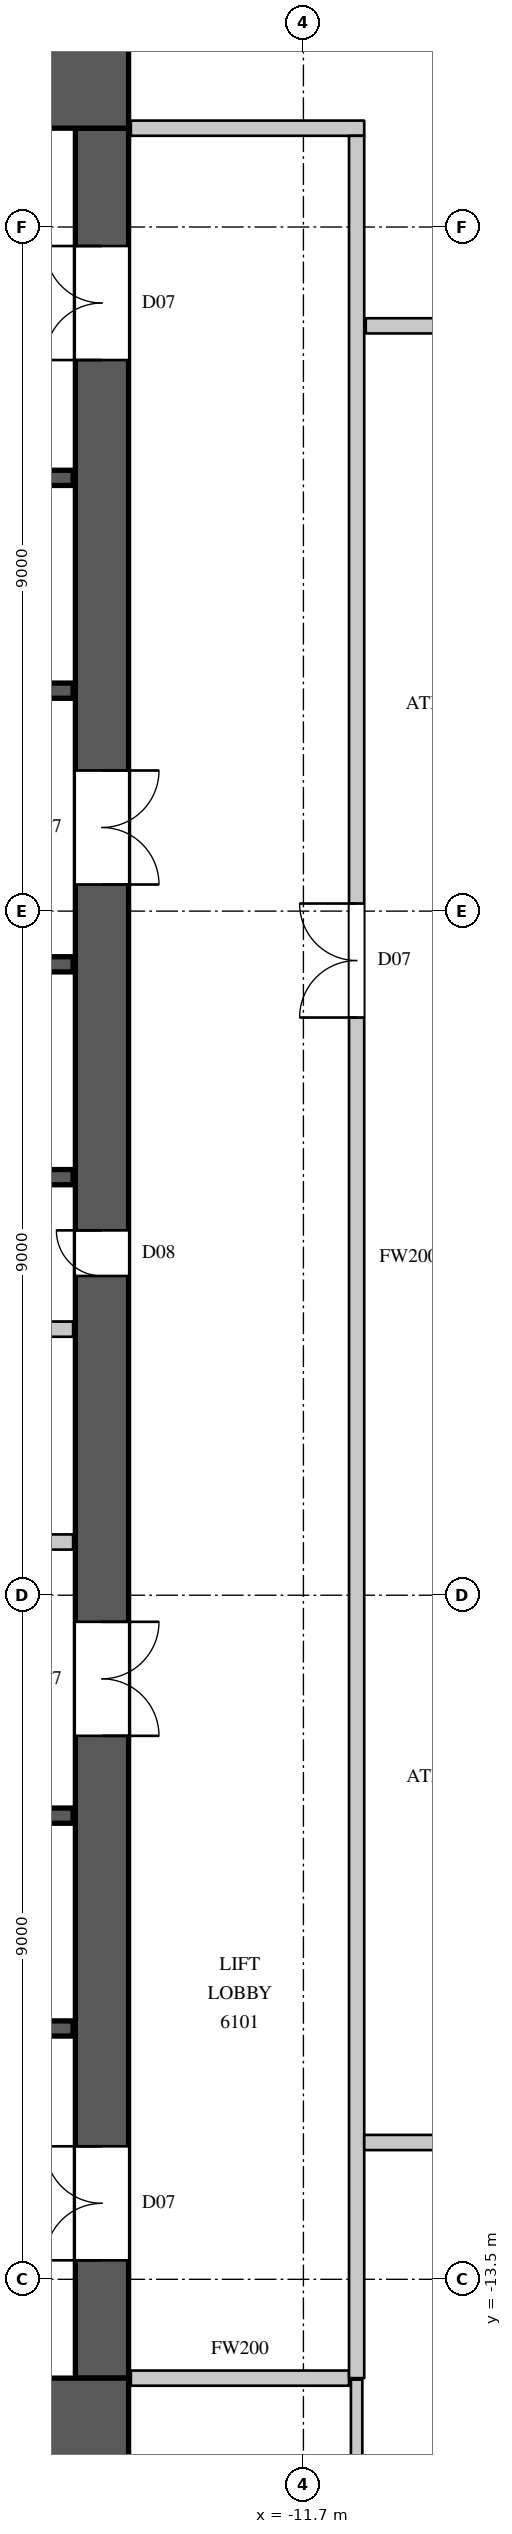
"""IFC4 building model, lengths in metres.
Left out: names, types, materials, properties, quantities, classifications, styles, units other than length and angle.
Written with IfcOpenShell. Run it as: python <this file> out.ifc"""

import sys

from ifc_helpers import new_model, si_unit, direction, frame, frame_2d, origin, place, context, subcontext, project, spatial, rectangle, extrude, element, fill, save


model = new_model("IFC4")
c1 = context("Model", 3, precision=1e-05, world=origin(), true_north=direction((0.0, 1.0)))
c2 = subcontext(c1, "Body", "Model", "MODEL_VIEW")
j1 = project(units=[si_unit("LENGTHUNIT", "METRE"), si_unit("PLANEANGLEUNIT", "RADIAN")], contexts=[c1])
p1 = place(None, origin())
s1 = spatial("IfcSite", under=j1, at=p1, CompositionType="ELEMENT")
p2 = place(p1, origin())
s2 = spatial("IfcBuilding", under=s1, at=p2, CompositionType="ELEMENT")
p3 = place(p2, frame((0.0, 0.0, 272.1)))
s3 = spatial("IfcBuildingStorey", under=s2, at=p3, CompositionType="ELEMENT", Elevation=272.1)
for number, where, z_axis, x_axis in (
    (1, (-30.0, 15.4, 0.0), (0.0, 0.0, 1.0), (1.0, 0.0, 0.0)),
    (2, (-30.0, -15.4, 0.0), (0.0, 0.0, 1.0), (1.0, 0.0, 0.0)),
):
    element("IfcWall", number, at=place(p3, frame(where, z_axis=z_axis, x_axis=x_axis)), inside=s3, PredefinedType="SHEAR", context=c2, shape_type="SweptSolid", body=[
        extrude(rectangle(XDim=16.0, YDim=1.2, at=frame_2d((8.0, 0.0))), origin(), (0.0, 0.0, 1.0), 4.1),
    ])
p4 = place(p3, frame((-14.35, -14.8, 0.0), z_axis=(0.0, 0.0, 1.0), x_axis=(0.0, 1.0, 0.0)))
e3 = element("IfcWall", 3, at=p4, inside=s3, PredefinedType="SHEAR", context=c2, shape_type="SweptSolid", body=[
    extrude(rectangle(XDim=29.6, YDim=0.7, at=frame_2d((14.8, 0.0))), origin(), (0.0, 0.0, 1.0), 4.1),
])
p5 = place(p4, frame((1.55, 0.0, 0.0)))
e4 = element("IfcOpeningElement", 4, at=p5, cuts=e3, PredefinedType="OPENING", context=c2, shape_type="SweptSolid", body=[
    extrude(rectangle(XDim=1.5, YDim=2.4, at=frame_2d((0.75, 1.2))), frame((0.0, 0.36, 0.0), z_axis=(0.0, -1.0, 0.0), x_axis=(1.0, 0.0, 0.0)), (0.0, 0.0, 1.0), 0.72),
])
p6 = place(p4, frame((26.55, 0.0, 0.0)))
e5 = element("IfcOpeningElement", 5, at=p6, cuts=e3, PredefinedType="OPENING", context=c2, shape_type="SweptSolid", body=[
    extrude(rectangle(XDim=1.5, YDim=2.4, at=frame_2d((0.75, 1.2))), frame((0.0, 0.36, 0.0), z_axis=(0.0, -1.0, 0.0), x_axis=(1.0, 0.0, 0.0)), (0.0, 0.0, 1.0), 0.72),
])
p7 = place(p4, frame((8.45, 0.0, 0.0)))
e6 = element("IfcOpeningElement", 6, at=p7, cuts=e3, PredefinedType="OPENING", context=c2, shape_type="SweptSolid", body=[
    extrude(rectangle(XDim=1.5, YDim=2.4, at=frame_2d((0.75, 1.2))), frame((0.0, 0.36, 0.0), z_axis=(0.0, -1.0, 0.0), x_axis=(1.0, 0.0, 0.0)), (0.0, 0.0, 1.0), 0.72),
])
p8 = place(p4, frame((19.65, 0.0, 0.0)))
e7 = element("IfcOpeningElement", 7, at=p8, cuts=e3, PredefinedType="OPENING", context=c2, shape_type="SweptSolid", body=[
    extrude(rectangle(XDim=1.5, YDim=2.4, at=frame_2d((0.75, 1.2))), frame((0.0, 0.36, 0.0), z_axis=(0.0, -1.0, 0.0), x_axis=(1.0, 0.0, 0.0)), (0.0, 0.0, 1.0), 0.72),
])
p9 = place(p4, frame((14.5, 0.0, 0.0)))
e8 = element("IfcOpeningElement", 8, at=p9, cuts=e3, PredefinedType="OPENING", context=c2, shape_type="SweptSolid", body=[
    extrude(rectangle(XDim=0.6, YDim=2.0, at=frame_2d((0.3, 1.0))), frame((0.0, 0.36, 0.0), z_axis=(0.0, -1.0, 0.0), x_axis=(1.0, 0.0, 0.0)), (0.0, 0.0, 1.0), 0.72),
])
p10 = place(p3, frame((-29.27, -3.8, 0.0), z_axis=(0.0, 0.0, 1.0), x_axis=(1.0, 0.0, 0.0)))
e9 = element("IfcWall", 9, at=p10, inside=s3, PredefinedType="PARTITIONING", context=c2, shape_type="SweptSolid", body=[
    extrude(rectangle(XDim=14.54, YDim=0.2, at=frame_2d((7.27, 0.0))), origin(), (0.0, 0.0, 1.0), 3.8),
])
p11 = place(p10, frame((0.8, 0.0, 0.0)))
e10 = element("IfcOpeningElement", 10, at=p11, cuts=e9, PredefinedType="OPENING", context=c2, shape_type="SweptSolid", body=[
    extrude(rectangle(XDim=0.9, YDim=2.2, at=frame_2d((0.45, 1.1))), frame((0.0, 0.11, 0.0), z_axis=(0.0, -1.0, 0.0), x_axis=(1.0, 0.0, 0.0)), (0.0, 0.0, 1.0), 0.22),
])
p12 = place(p10, frame((3.8, 0.0, 0.0)))
e11 = element("IfcOpeningElement", 11, at=p12, cuts=e9, PredefinedType="OPENING", context=c2, shape_type="SweptSolid", body=[
    extrude(rectangle(XDim=0.9, YDim=2.2, at=frame_2d((0.45, 1.1))), frame((0.0, 0.11, 0.0), z_axis=(0.0, -1.0, 0.0), x_axis=(1.0, 0.0, 0.0)), (0.0, 0.0, 1.0), 0.22),
])
p13 = place(p10, frame((8.25, 0.0, 0.0)))
e12 = element("IfcOpeningElement", 12, at=p13, cuts=e9, PredefinedType="OPENING", context=c2, shape_type="SweptSolid", body=[
    extrude(rectangle(XDim=0.9, YDim=2.2, at=frame_2d((0.45, 1.1))), frame((0.0, 0.11, 0.0), z_axis=(0.0, -1.0, 0.0), x_axis=(1.0, 0.0, 0.0)), (0.0, 0.0, 1.0), 0.22),
])
p14 = place(p10, frame((12.35, 0.0, 0.0)))
e13 = element("IfcOpeningElement", 13, at=p14, cuts=e9, PredefinedType="OPENING", context=c2, shape_type="SweptSolid", body=[
    extrude(rectangle(XDim=0.9, YDim=2.2, at=frame_2d((0.45, 1.1))), frame((0.0, 0.11, 0.0), z_axis=(0.0, -1.0, 0.0), x_axis=(1.0, 0.0, 0.0)), (0.0, 0.0, 1.0), 0.22),
])
p15 = place(p3, frame((-13.97, -14.8, 0.0), z_axis=(0.0, 0.0, 1.0), x_axis=(1.0, 0.0, 0.0)))
e14 = element("IfcWall", 14, at=p15, inside=s3, PredefinedType="PARTITIONING", context=c2, shape_type="SweptSolid", body=[
    extrude(rectangle(XDim=2.87, YDim=0.2, at=frame_2d((1.435, 0.0))), origin(), (0.0, 0.0, 1.0), 3.8),
])
p16 = place(p3, frame((-13.97, 14.8, 0.0), z_axis=(0.0, 0.0, 1.0), x_axis=(1.0, 0.0, 0.0)))
e15 = element("IfcWall", 15, at=p16, inside=s3, PredefinedType="PARTITIONING", context=c2, shape_type="SweptSolid", body=[
    extrude(rectangle(XDim=3.07, YDim=0.2, at=frame_2d((1.535, 0.0))), origin(), (0.0, 0.0, 1.0), 3.8),
])
p17 = place(p3, frame((-11.0, -14.8, 0.0), z_axis=(0.0, 0.0, 1.0), x_axis=(0.0, 1.0, 0.0)))
e16 = element("IfcWall", 16, at=p17, inside=s3, PredefinedType="PARTITIONING", context=c2, shape_type="SweptSolid", body=[
    extrude(rectangle(XDim=29.5, YDim=0.2, at=frame_2d((14.75, 0.0))), origin(), (0.0, 0.0, 1.0), 3.8),
])
p18 = place(p17, frame((17.9, 0.0, 0.0)))
e17 = element("IfcOpeningElement", 17, at=p18, cuts=e16, PredefinedType="OPENING", context=c2, shape_type="SweptSolid", body=[
    extrude(rectangle(XDim=1.5, YDim=2.4, at=frame_2d((0.75, 1.2))), frame((0.0, 0.11, 0.0), z_axis=(0.0, -1.0, 0.0), x_axis=(1.0, 0.0, 0.0)), (0.0, 0.0, 1.0), 0.22),
])
p19 = place(p3, frame((-10.9, -11.7, 0.0), z_axis=(0.0, 0.0, 1.0), x_axis=(1.0, 0.0, 0.0)))
e18 = element("IfcWall", 18, at=p19, inside=s3, PredefinedType="PARTITIONING", context=c2, shape_type="SweptSolid", body=[
    extrude(rectangle(XDim=21.5, YDim=0.2, at=frame_2d((10.75, 0.0))), origin(), (0.0, 0.0, 1.0), 3.8),
])
p20 = place(p19, frame((0.95, 0.0, 0.0)))
e19 = element("IfcOpeningElement", 19, at=p20, cuts=e18, PredefinedType="OPENING", context=c2, shape_type="SweptSolid", body=[
    extrude(rectangle(XDim=0.95, YDim=2.2, at=frame_2d((0.475, 1.1))), frame((0.0, 0.11, 0.0), z_axis=(0.0, -1.0, 0.0), x_axis=(1.0, 0.0, 0.0)), (0.0, 0.0, 1.0), 0.22),
])
p21 = place(p19, frame((4.2, 0.0, 0.0)))
e20 = element("IfcOpeningElement", 20, at=p21, cuts=e18, PredefinedType="OPENING", context=c2, shape_type="SweptSolid", body=[
    extrude(rectangle(XDim=0.9, YDim=2.2, at=frame_2d((0.45, 1.1))), frame((0.0, 0.11, 0.0), z_axis=(0.0, -1.0, 0.0), x_axis=(1.0, 0.0, 0.0)), (0.0, 0.0, 1.0), 0.22),
])
p22 = place(p19, frame((6.85, 0.0, 0.0)))
e21 = element("IfcOpeningElement", 21, at=p22, cuts=e18, PredefinedType="OPENING", context=c2, shape_type="SweptSolid", body=[
    extrude(rectangle(XDim=1.1, YDim=2.4, at=frame_2d((0.55, 1.2))), frame((0.0, 0.11, 0.0), z_axis=(0.0, -1.0, 0.0), x_axis=(1.0, 0.0, 0.0)), (0.0, 0.0, 1.0), 0.22),
])
p23 = place(p19, frame((9.95, 0.0, 0.0)))
e22 = element("IfcOpeningElement", 22, at=p23, cuts=e18, PredefinedType="OPENING", context=c2, shape_type="SweptSolid", body=[
    extrude(rectangle(XDim=1.1, YDim=2.4, at=frame_2d((0.55, 1.2))), frame((0.0, 0.11, 0.0), z_axis=(0.0, -1.0, 0.0), x_axis=(1.0, 0.0, 0.0)), (0.0, 0.0, 1.0), 0.22),
])
p24 = place(p3, frame((-10.88, 12.2, 0.0), z_axis=(0.0, 0.0, 1.0), x_axis=(1.0, 0.0, 0.0)))
e23 = element("IfcWall", 23, at=p24, inside=s3, PredefinedType="PARTITIONING", context=c2, shape_type="SweptSolid", body=[
    extrude(rectangle(XDim=3.736, YDim=0.2, at=frame_2d((1.868, 0.0))), origin(), (0.0, 0.0, 1.0), 3.8),
])
p25 = place(p3, frame((-11.0, -23.757, 0.0), z_axis=(0.0, 0.0, 1.0), x_axis=(0.0, 1.0, 0.0)))
e24 = element("IfcWall", 24, at=p25, inside=s3, PredefinedType="PARTITIONING", context=c2, shape_type="SweptSolid", body=[
    extrude(rectangle(XDim=8.937, YDim=0.15, at=frame_2d((4.468, 0.0))), origin(), (0.0, 0.0, 1.0), 3.8),
])
p26 = place(p3, frame((-29.27, -1.0, 0.0), z_axis=(0.0, 0.0, 1.0), x_axis=(1.0, 0.0, 0.0)))
e25 = element("IfcWall", 25, at=p26, inside=s3, PredefinedType="PARTITIONING", context=c2, shape_type="SweptSolid", body=[
    extrude(rectangle(XDim=14.54, YDim=0.2, at=frame_2d((7.27, 0.0))), origin(), (0.0, 0.0, 1.0), 3.8),
])
p27 = place(p3, frame((-17.92, -10.2, 0.0), z_axis=(0.0, 0.0, 1.0), x_axis=(1.0, 0.0, 0.0)))
e26 = element("IfcWall", 26, at=p27, inside=s3, PredefinedType="SHEAR", context=c2, shape_type="SweptSolid", body=[
    extrude(rectangle(XDim=3.19, YDim=0.2, at=frame_2d((1.595, 0.0))), origin(), (0.0, 0.0, 1.0), 3.8),
])
p28 = place(p27, frame((1.05, 0.0, 0.0)))
e27 = element("IfcOpeningElement", 27, at=p28, cuts=e26, PredefinedType="OPENING", context=c2, shape_type="SweptSolid", body=[
    extrude(rectangle(XDim=1.1, YDim=2.2, at=frame_2d((0.55, 1.1))), frame((0.0, 0.11, 0.0), z_axis=(0.0, -1.0, 0.0), x_axis=(1.0, 0.0, 0.0)), (0.0, 0.0, 1.0), 0.22),
])
for number, where, z_axis, x_axis in (
    (28, (-17.9, -7.4, 0.0), (0.0, 0.0, 1.0), (1.0, 0.0, 0.0)),
    (29, (-17.9, 1.0, 0.0), (0.0, 0.0, 1.0), (1.0, 0.0, 0.0)),
):
    element("IfcWall", number, at=place(p3, frame(where, z_axis=z_axis, x_axis=x_axis)), inside=s3, PredefinedType="SHEAR", context=c2, shape_type="SweptSolid", body=[
        extrude(rectangle(XDim=3.17, YDim=0.2, at=frame_2d((1.585, 0.0))), origin(), (0.0, 0.0, 1.0), 3.8),
    ])
p29 = place(p3, frame((-17.9, 3.8, 0.0), z_axis=(0.0, 0.0, 1.0), x_axis=(1.0, 0.0, 0.0)))
e30 = element("IfcWall", 30, at=p29, inside=s3, PredefinedType="SHEAR", context=c2, shape_type="SweptSolid", body=[
    extrude(rectangle(XDim=3.17, YDim=0.2, at=frame_2d((1.585, 0.0))), origin(), (0.0, 0.0, 1.0), 3.8),
])
p30 = place(p29, frame((1.05, 0.0, 0.0)))
e31 = element("IfcOpeningElement", 31, at=p30, cuts=e30, PredefinedType="OPENING", context=c2, shape_type="SweptSolid", body=[
    extrude(rectangle(XDim=1.1, YDim=2.2, at=frame_2d((0.55, 1.1))), frame((0.0, 0.11, 0.0), z_axis=(0.0, -1.0, 0.0), x_axis=(1.0, 0.0, 0.0)), (0.0, 0.0, 1.0), 0.22),
])
p31 = place(p3, frame((-17.92, 7.4, 0.0), z_axis=(0.0, 0.0, 1.0), x_axis=(1.0, 0.0, 0.0)))
e32 = element("IfcWall", 32, at=p31, inside=s3, PredefinedType="SHEAR", context=c2, shape_type="SweptSolid", body=[
    extrude(rectangle(XDim=3.19, YDim=0.2, at=frame_2d((1.595, 0.0))), origin(), (0.0, 0.0, 1.0), 3.8),
])
p32 = place(p3, frame((-17.92, 10.2, 0.0), z_axis=(0.0, 0.0, 1.0), x_axis=(1.0, 0.0, 0.0)))
e33 = element("IfcWall", 33, at=p32, inside=s3, PredefinedType="SHEAR", context=c2, shape_type="SweptSolid", body=[
    extrude(rectangle(XDim=3.19, YDim=0.2, at=frame_2d((1.595, 0.0))), origin(), (0.0, 0.0, 1.0), 3.8),
])
p33 = place(p32, frame((1.05, 0.0, 0.0)))
e34 = element("IfcOpeningElement", 34, at=p33, cuts=e33, PredefinedType="OPENING", context=c2, shape_type="SweptSolid", body=[
    extrude(rectangle(XDim=1.1, YDim=2.2, at=frame_2d((0.55, 1.1))), frame((0.0, 0.11, 0.0), z_axis=(0.0, -1.0, 0.0), x_axis=(1.0, 0.0, 0.0)), (0.0, 0.0, 1.0), 0.22),
])
p34 = place(p18, origin())
e35 = element("IfcDoor", 35, at=p34, inside=s3, OperationType="DOUBLE_DOOR_SINGLE_SWING", PredefinedType="DOOR", context=c2, shape_type="SweptSolid", body=[
    extrude(rectangle(XDim=1.5, YDim=2.4, at=frame_2d((0.75, 1.2))), frame((0.0, 0.025, 0.0), z_axis=(0.0, -1.0, 0.0), x_axis=(1.0, 0.0, 0.0)), (0.0, 0.0, 1.0), 0.05),
])
fill(e17, e35)
p35 = place(p5, origin())
e36 = element("IfcDoor", 36, at=p35, inside=s3, OperationType="DOUBLE_DOOR_SINGLE_SWING", PredefinedType="DOOR", context=c2, shape_type="SweptSolid", body=[
    extrude(rectangle(XDim=1.5, YDim=2.4, at=frame_2d((0.75, 1.2))), frame((0.0, 0.345, 0.0), z_axis=(0.0, -1.0, 0.0), x_axis=(1.0, 0.0, 0.0)), (0.0, 0.0, 1.0), 0.05),
])
fill(e4, e36)
p36 = place(p6, origin())
e37 = element("IfcDoor", 37, at=p36, inside=s3, OperationType="DOUBLE_DOOR_SINGLE_SWING", PredefinedType="DOOR", context=c2, shape_type="SweptSolid", body=[
    extrude(rectangle(XDim=1.5, YDim=2.4, at=frame_2d((0.75, 1.2))), frame((0.0, 0.345, 0.0), z_axis=(0.0, -1.0, 0.0), x_axis=(1.0, 0.0, 0.0)), (0.0, 0.0, 1.0), 0.05),
])
fill(e5, e37)
p37 = place(p7, origin())
e38 = element("IfcDoor", 38, at=p37, inside=s3, OperationType="DOUBLE_DOOR_SINGLE_SWING", PredefinedType="DOOR", context=c2, shape_type="SweptSolid", body=[
    extrude(rectangle(XDim=1.5, YDim=2.4, at=frame_2d((0.75, 1.2))), frame((0.0, -0.295, 0.0), z_axis=(0.0, -1.0, 0.0), x_axis=(1.0, 0.0, 0.0)), (0.0, 0.0, 1.0), 0.05),
])
fill(e6, e38)
p38 = place(p8, origin())
e39 = element("IfcDoor", 39, at=p38, inside=s3, OperationType="DOUBLE_DOOR_SINGLE_SWING", PredefinedType="DOOR", context=c2, shape_type="SweptSolid", body=[
    extrude(rectangle(XDim=1.5, YDim=2.4, at=frame_2d((0.75, 1.2))), frame((0.0, -0.295, 0.0), z_axis=(0.0, -1.0, 0.0), x_axis=(1.0, 0.0, 0.0)), (0.0, 0.0, 1.0), 0.05),
])
fill(e7, e39)
p39 = place(p9, origin())
e40 = element("IfcDoor", 40, at=p39, inside=s3, OperationType="SINGLE_SWING_RIGHT", PredefinedType="DOOR", context=c2, shape_type="SweptSolid", body=[
    extrude(rectangle(XDim=0.6, YDim=2.0, at=frame_2d((0.3, 1.0))), frame((0.0, 0.345, 0.0), z_axis=(0.0, -1.0, 0.0), x_axis=(1.0, 0.0, 0.0)), (0.0, 0.0, 1.0), 0.05),
])
fill(e8, e40)
save(model, sys.argv[1])
